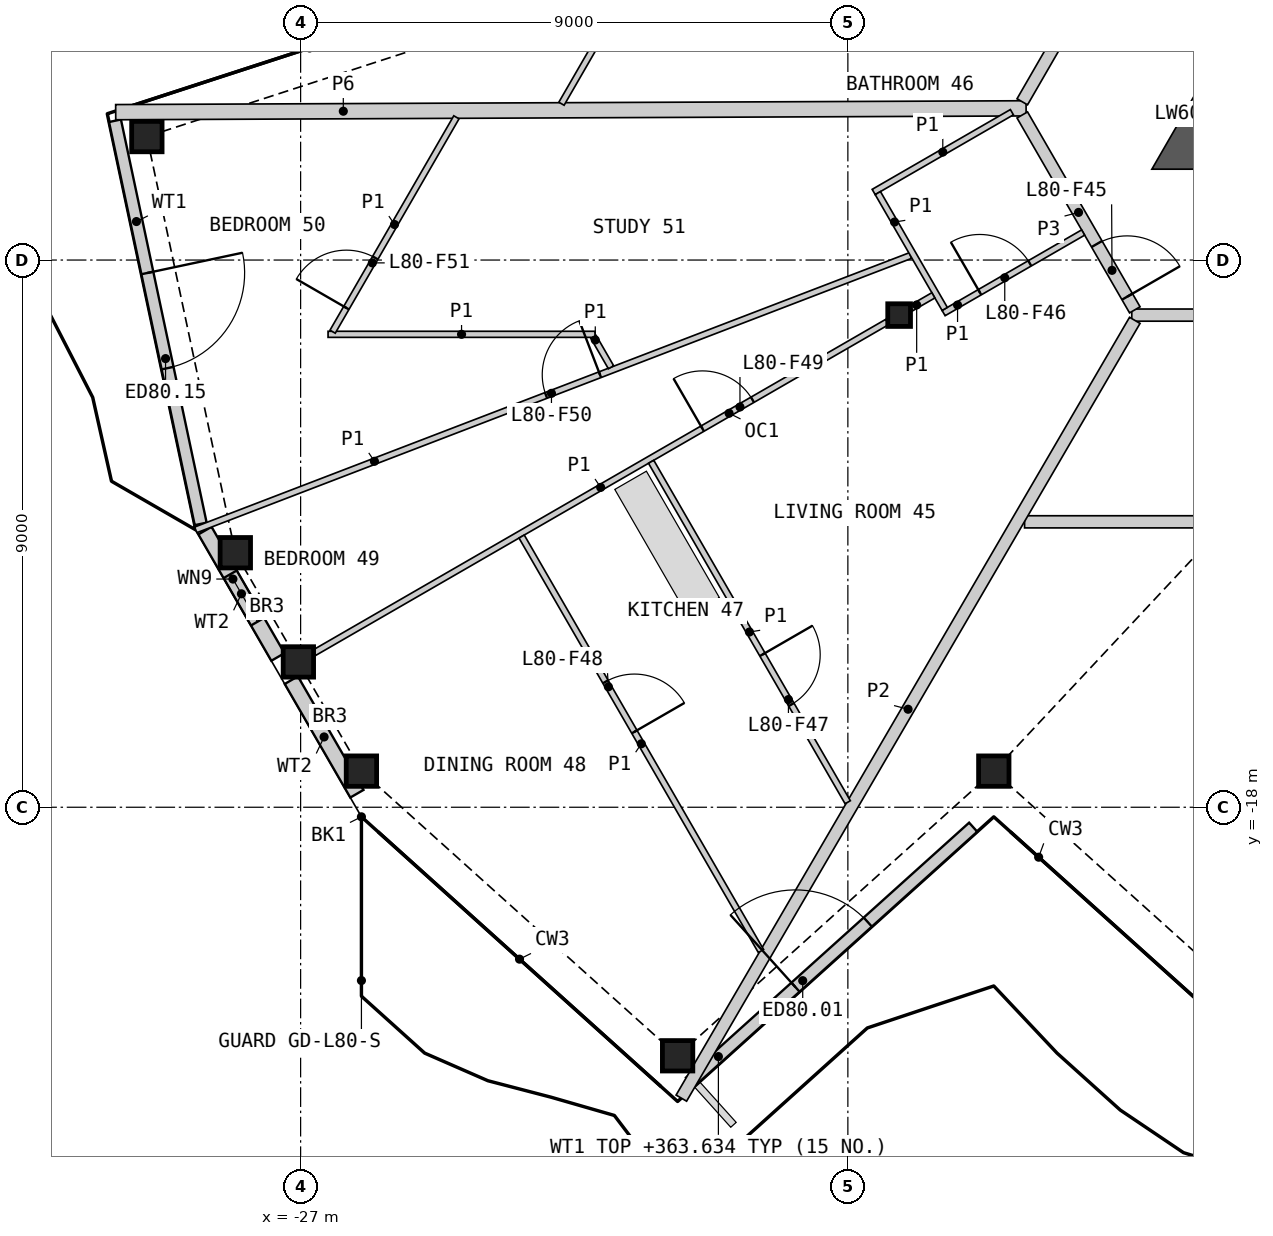
"""IFC4 building model, lengths in metres.
Left out: names, types, materials, properties, quantities, classifications, styles, units other than length and angle.
Written with IfcOpenShell. Run it as: python <this file> out.ifc"""

import sys

from ifc_helpers import new_model, si_unit, direction, frame, frame_2d, origin, origin_2d, place, context, subcontext, project, spatial, polyline, rectangle, hollow_rectangle, i_section, outline, extrude, element, fill, save


model = new_model("IFC4")
c1 = context("Model", 3, precision=1e-05, world=origin(), true_north=direction((0.0, 1.0)))
c2 = subcontext(c1, "Body", "Model", "MODEL_VIEW")
j1 = project(units=[si_unit("LENGTHUNIT", "METRE"), si_unit("PLANEANGLEUNIT", "RADIAN")], contexts=[c1])
p1 = place(None, origin())
s1 = spatial("IfcSite", under=j1, at=p1, CompositionType="ELEMENT")
p2 = place(p1, origin())
s2 = spatial("IfcBuilding", under=s1, at=p2, CompositionType="ELEMENT")
p3 = place(p2, frame((0.0, 0.0, 361.0)))
s3 = spatial("IfcBuildingStorey", under=s2, at=p3, CompositionType="ELEMENT", Elevation=361.0)
for number, where, z_axis, x_axis in (
    (1, (-26.0, -17.406, 0.0), (0.0, 0.0, 1.0), (1.0, 0.0, 0.0)),
    (2, (-20.8, -22.088, 0.0), (0.0, 0.0, 1.0), (1.0, 0.0, 0.0)),
    (3, (-15.6, -17.406, 0.0), (0.0, 0.0, 1.0), (1.0, 0.0, 0.0)),
    (4, (-29.529, -6.969, 0.0), (0.0, 0.0, 1.0), (1.0, 0.0, 0.0)),
    (5, (-28.074, -13.814, 0.0), (0.0, 0.0, 1.0), (1.0, 0.0, 0.0)),
    (6, (-27.037, -15.61, 0.0), (0.0, 0.0, 1.0), (1.0, 0.0, 0.0)),
):
    element("IfcColumn", number, at=place(p3, frame(where, z_axis=z_axis, x_axis=x_axis)), inside=s3, PredefinedType="COLUMN", context=c2, shape_type="SweptSolid", body=[
        extrude(hollow_rectangle(XDim=0.5, YDim=0.5, WallThickness=0.03, at=origin_2d()), origin(), (0.0, 0.0, 1.0), 3.4),
    ])
p4 = place(p3, frame((-17.157, -9.906, 0.0), z_axis=(0.0, 0.0, 1.0), x_axis=(1.0, 0.0, 0.0)))
e7 = element("IfcColumn", 7, at=p4, inside=s3, PredefinedType="COLUMN", context=c2, shape_type="SweptSolid", body=[
    extrude(i_section(OverallWidth=0.374, OverallDepth=0.372, WebThickness=0.016, FlangeThickness=0.026, at=origin_2d()), origin(), (0.0, 0.0, 1.0), 3.4),
])
p5 = place(p3, frame((-20.595, -22.52, 0.0), z_axis=(0.0, 0.0, 1.0), x_axis=(0.743137181878, 0.669139095339, 0.0)))
e8 = element("IfcWall", 8, at=p5, inside=s3, PredefinedType="SOLIDWALL", context=c2, shape_type="SweptSolid", body=[
    extrude(rectangle(XDim=6.265, YDim=0.2, at=frame_2d((3.133, 0.0))), origin(), (0.0, 0.0, 1.0), 2.634),
])
p6 = place(p5, frame((2.333, 0.0, 0.0)))
e9 = element("IfcOpeningElement", 9, at=p6, cuts=e8, PredefinedType="OPENING", context=c2, shape_type="SweptSolid", body=[
    extrude(rectangle(XDim=1.6, YDim=2.25, at=frame_2d((0.8, 1.125))), frame((0.0, 0.11, 0.0), z_axis=(0.0, -1.0, 0.0), x_axis=(1.0, 0.0, 0.0)), (0.0, 0.0, 1.0), 0.22),
])
p7 = place(p3, frame((-30.053, -6.709, 0.0), z_axis=(0.0, 0.0, 1.0), x_axis=(0.207917767315, -0.978146309115, 0.0)))
e10 = element("IfcWall", 10, at=p7, inside=s3, PredefinedType="SOLIDWALL", context=c2, shape_type="SweptSolid", body=[
    extrude(rectangle(XDim=6.779, YDim=0.2, at=frame_2d((3.389, 0.0))), origin(), (0.0, 0.0, 1.0), 2.634),
])
p8 = place(p7, frame((2.559, 0.0, 0.0)))
e11 = element("IfcOpeningElement", 11, at=p8, cuts=e10, PredefinedType="OPENING", context=c2, shape_type="SweptSolid", body=[
    extrude(rectangle(XDim=1.6, YDim=2.25, at=frame_2d((0.8, 1.125))), frame((0.0, 0.11, 0.0), z_axis=(0.0, -1.0, 0.0), x_axis=(1.0, 0.0, 0.0)), (0.0, 0.0, 1.0), 0.22),
])
p9 = place(p3, frame((-28.573, -13.45, 0.0), z_axis=(0.0, 0.0, 1.0), x_axis=(0.499969057507, -0.866043267704, 0.0)))
e12 = element("IfcWall", 12, at=p9, inside=s3, PredefinedType="SOLIDWALL", context=c2, shape_type="SweptSolid", body=[
    extrude(rectangle(XDim=2.4, YDim=0.25, at=frame_2d((1.2, 0.0))), origin(), (0.0, 0.0, 1.0), 2.634),
])
p10 = place(p9, frame((0.83, 0.0, 0.6)))
e13 = element("IfcOpeningElement", 13, at=p10, cuts=e12, PredefinedType="OPENING", context=c2, shape_type="SweptSolid", body=[
    extrude(rectangle(XDim=0.9, YDim=1.8, at=frame_2d((0.45, 0.9))), frame((0.0, 0.135, 0.0), z_axis=(0.0, -1.0, 0.0), x_axis=(1.0, 0.0, 0.0)), (0.0, 0.0, 1.0), 0.27),
])
p11 = place(p3, frame((-27.153, -15.91, 0.0), z_axis=(0.0, 0.0, 1.0), x_axis=(0.50000982419, -0.866019731711, 0.0)))
e14 = element("IfcWall", 14, at=p11, inside=s3, PredefinedType="SOLIDWALL", context=c2, shape_type="SweptSolid", body=[
    extrude(rectangle(XDim=2.157, YDim=0.25, at=frame_2d((1.079, 0.0))), origin(), (0.0, 0.0, 1.0), 2.634),
])
p12 = place(p3, origin())
e15 = element("IfcWall", 15, at=p12, inside=s3, PredefinedType="SHEAR", context=c2, shape_type="SweptSolid", body=[
    extrude(outline(polyline([(-12.48, -6.606), (-11.961, -6.906), (-11.961, -7.506), (-13.0, -7.506), (-12.48, -6.606)])), origin(), (0.0, 0.0, 1.0), 3.1),
])
p13 = place(p3, frame((-10.925, -4.511, 0.0), z_axis=(0.0, 0.0, 1.0), x_axis=(-0.500018667571, -0.866014625789, 0.0)))
e16 = element("IfcWall", 16, at=p13, inside=s3, PredefinedType="SHEAR", context=c2, shape_type="SweptSolid", body=[
    extrude(rectangle(XDim=2.592, YDim=0.6, at=frame_2d((1.296, 0.0))), origin(), (0.0, 0.0, 1.0), 3.1),
])
p14 = place(p13, frame((0.6, 0.0, 0.0)))
e17 = element("IfcOpeningElement", 17, at=p14, cuts=e16, PredefinedType="OPENING", context=c2, shape_type="SweptSolid", body=[
    extrude(rectangle(XDim=1.0, YDim=2.1, at=frame_2d((0.5, 1.05))), frame((0.0, 0.31, 0.0), z_axis=(0.0, -1.0, 0.0), x_axis=(1.0, 0.0, 0.0)), (0.0, 0.0, 1.0), 0.62),
])
p15 = place(p3, frame((-30.041, -6.568, 0.0), z_axis=(0.0, 0.0, 1.0), x_axis=(0.999991150877, 0.004206918925, 0.0)))
e18 = element("IfcWall", 18, at=p15, inside=s3, PredefinedType="PARTITIONING", context=c2, shape_type="SweptSolid", body=[
    extrude(rectangle(XDim=14.973, YDim=0.25, at=frame_2d((7.486, 0.0))), origin(), (0.0, 0.0, 1.0), 2.33),
])
p16 = place(p3, frame((-13.331, -9.906, 0.0), z_axis=(0.0, 0.0, 1.0), x_axis=(1.0, 0.0, 0.0)))
e19 = element("IfcWall", 19, at=p16, inside=s3, PredefinedType="PARTITIONING", context=c2, shape_type="SweptSolid", body=[
    extrude(rectangle(XDim=4.555, YDim=0.2, at=frame_2d((2.278, 0.0))), origin(), (0.0, 0.0, 1.0), 3.1),
])
p17 = place(p3, frame((-15.131, -6.397, 0.0), z_axis=(0.0, 0.0, 1.0), x_axis=(0.499986217557, 0.866033360935, 0.0)))
e20 = element("IfcWall", 20, at=p17, inside=s3, PredefinedType="PARTITIONING", context=c2, shape_type="SweptSolid", body=[
    extrude(rectangle(XDim=4.3, YDim=0.2, at=frame_2d((2.15, 0.0))), origin(), (0.0, 0.0, 1.0), 3.1),
])
p18 = place(p3, frame((-15.131, -6.614, 0.0), z_axis=(0.0, 0.0, 1.0), x_axis=(0.499948957823, -0.866054870994, 0.0)))
e21 = element("IfcWall", 21, at=p18, inside=s3, PredefinedType="PARTITIONING", context=c2, shape_type="SweptSolid", body=[
    extrude(rectangle(XDim=3.701, YDim=0.2, at=frame_2d((1.851, 0.0))), origin(), (0.0, 0.0, 1.0), 3.1),
])
p19 = place(p18, frame((2.451, 0.0, 0.0)))
e22 = element("IfcOpeningElement", 22, at=p19, cuts=e21, PredefinedType="OPENING", context=c2, shape_type="SweptSolid", body=[
    extrude(rectangle(XDim=1.0, YDim=2.1, at=frame_2d((0.5, 1.05))), frame((0.0, 0.11, 0.0), z_axis=(0.0, -1.0, 0.0), x_axis=(1.0, 0.0, 0.0)), (0.0, 0.0, 1.0), 0.22),
])
p20 = place(p3, frame((-15.094, -13.306, 0.0), z_axis=(0.0, 0.0, 1.0), x_axis=(1.0, 0.0, 0.0)))
e23 = element("IfcWall", 23, at=p20, inside=s3, PredefinedType="PARTITIONING", context=c2, shape_type="SweptSolid", body=[
    extrude(rectangle(XDim=14.994, YDim=0.2, at=frame_2d((7.497, 0.0))), origin(), (0.0, 0.0, 1.0), 2.33),
])
p21 = place(p20, frame((6.27, 0.0, 0.0)))
e24 = element("IfcOpeningElement", 24, at=p21, cuts=e23, PredefinedType="OPENING", context=c2, shape_type="SweptSolid", body=[
    extrude(rectangle(XDim=0.95, YDim=2.1, at=frame_2d((0.475, 1.05))), frame((0.0, 0.11, 0.0), z_axis=(0.0, -1.0, 0.0), x_axis=(1.0, 0.0, 0.0)), (0.0, 0.0, 1.0), 0.22),
])
p22 = place(p3, frame((-20.739, -22.784, 0.0), z_axis=(0.0, 0.0, 1.0), x_axis=(0.50362599185, 0.863921790635, 0.0)))
e25 = element("IfcWall", 25, at=p22, inside=s3, PredefinedType="PARTITIONING", context=c2, shape_type="SweptSolid", body=[
    extrude(rectangle(XDim=14.807, YDim=0.2, at=frame_2d((7.404, 0.0))), origin(), (0.0, 0.0, 1.0), 2.33),
])
p23 = place(p3, frame((-28.725, -13.438, 0.0), z_axis=(0.0, 0.0, 1.0), x_axis=(0.933580312145, 0.358368247444, 0.0)))
e26 = element("IfcWall", 26, at=p23, inside=s3, PredefinedType="PARTITIONING", context=c2, shape_type="SweptSolid", body=[
    extrude(rectangle(XDim=12.59, YDim=0.1, at=frame_2d((6.295, 0.0))), origin(), (0.0, 0.0, 1.0), 2.33),
])
p24 = place(p23, frame((6.171, 0.0, 0.0)))
e27 = element("IfcOpeningElement", 27, at=p24, cuts=e26, PredefinedType="OPENING", context=c2, shape_type="SweptSolid", body=[
    extrude(rectangle(XDim=0.95, YDim=2.1, at=frame_2d((0.475, 1.05))), frame((0.0, 0.06, 0.0), z_axis=(0.0, -1.0, 0.0), x_axis=(1.0, 0.0, 0.0)), (0.0, 0.0, 1.0), 0.12),
])
p25 = place(p3, frame((-26.777, -15.46, 0.0), z_axis=(0.0, 0.0, 1.0), x_axis=(0.866019680922, 0.500009912158, 0.0)))
e28 = element("IfcWall", 28, at=p25, inside=s3, PredefinedType="PARTITIONING", context=c2, shape_type="SweptSolid", body=[
    extrude(rectangle(XDim=10.881, YDim=0.1, at=frame_2d((5.44, 0.0))), origin(), (0.0, 0.0, 1.0), 2.33),
])
p26 = place(p25, frame((7.373, 0.0, 0.0)))
e29 = element("IfcOpeningElement", 29, at=p26, cuts=e28, PredefinedType="OPENING", context=c2, shape_type="SweptSolid", body=[
    extrude(rectangle(XDim=0.95, YDim=2.1, at=frame_2d((0.475, 1.05))), frame((0.0, 0.06, 0.0), z_axis=(0.0, -1.0, 0.0), x_axis=(1.0, 0.0, 0.0)), (0.0, 0.0, 1.0), 0.12),
])
p27 = place(p3, frame((-23.365, -13.548, 0.0), z_axis=(0.0, 0.0, 1.0), x_axis=(0.500011483804, -0.866018773506, 0.0)))
e30 = element("IfcWall", 30, at=p27, inside=s3, PredefinedType="PARTITIONING", context=c2, shape_type="SweptSolid", body=[
    extrude(rectangle(XDim=7.872, YDim=0.1, at=frame_2d((3.936, 0.0))), origin(), (0.0, 0.0, 1.0), 2.33),
])
p28 = place(p27, frame((2.759, 0.0, 0.0)))
e31 = element("IfcOpeningElement", 31, at=p28, cuts=e30, PredefinedType="OPENING", context=c2, shape_type="SweptSolid", body=[
    extrude(rectangle(XDim=0.95, YDim=2.1, at=frame_2d((0.475, 1.05))), frame((0.0, 0.06, 0.0), z_axis=(0.0, -1.0, 0.0), x_axis=(1.0, 0.0, 0.0)), (0.0, 0.0, 1.0), 0.12),
])
p29 = place(p3, frame((-22.71, -6.429, 0.0), z_axis=(0.0, 0.0, 1.0), x_axis=(0.499984737558, 0.86603421538, 0.0)))
e32 = element("IfcWall", 32, at=p29, inside=s3, PredefinedType="PARTITIONING", context=c2, shape_type="SweptSolid", body=[
    extrude(rectangle(XDim=6.473, YDim=0.1, at=frame_2d((3.236, 0.0))), origin(), (0.0, 0.0, 1.0), 2.33),
])
p30 = place(p29, frame((3.063, 0.0, 0.0)))
e33 = element("IfcOpeningElement", 33, at=p30, cuts=e32, PredefinedType="OPENING", context=c2, shape_type="SweptSolid", body=[
    extrude(rectangle(XDim=0.95, YDim=2.1, at=frame_2d((0.475, 1.05))), frame((0.0, 0.06, 0.0), z_axis=(0.0, -1.0, 0.0), x_axis=(1.0, 0.0, 0.0)), (0.0, 0.0, 1.0), 0.12),
])
p31 = place(p3, frame((-21.235, -12.318, 0.0), z_axis=(0.0, 0.0, 1.0), x_axis=(0.500008973052, -0.866020223129, 0.0)))
e34 = element("IfcWall", 34, at=p31, inside=s3, PredefinedType="PARTITIONING", context=c2, shape_type="SweptSolid", body=[
    extrude(rectangle(XDim=6.466, YDim=0.1, at=frame_2d((3.233, 0.0))), origin(), (0.0, 0.0, 1.0), 2.33),
])
p32 = place(p31, frame((3.661, 0.0, 0.0)))
e35 = element("IfcOpeningElement", 35, at=p32, cuts=e34, PredefinedType="OPENING", context=c2, shape_type="SweptSolid", body=[
    extrude(rectangle(XDim=0.95, YDim=2.1, at=frame_2d((0.475, 1.05))), frame((0.0, 0.06, 0.0), z_axis=(0.0, -1.0, 0.0), x_axis=(1.0, 0.0, 0.0)), (0.0, 0.0, 1.0), 0.12),
])
p33 = place(p3, frame((-26.549, -10.222, 0.0), z_axis=(0.0, 0.0, 1.0), x_axis=(1.0, 0.0, 0.0)))
e36 = element("IfcWall", 36, at=p33, inside=s3, PredefinedType="PARTITIONING", context=c2, shape_type="SweptSolid", body=[
    extrude(rectangle(XDim=4.391, YDim=0.1, at=frame_2d((2.195, 0.0))), origin(), (0.0, 0.0, 1.0), 2.33),
])
p34 = place(p3, frame((-26.474, -10.178, 0.0), z_axis=(0.0, 0.0, 1.0), x_axis=(0.499995835917, 0.866027807905, 0.0)))
e37 = element("IfcWall", 37, at=p34, inside=s3, PredefinedType="PARTITIONING", context=c2, shape_type="SweptSolid", body=[
    extrude(rectangle(XDim=4.071, YDim=0.1, at=frame_2d((2.036, 0.0))), origin(), (0.0, 0.0, 1.0), 2.33),
])
p35 = place(p34, frame((0.452, 0.0, 0.0)))
e38 = element("IfcOpeningElement", 38, at=p35, cuts=e37, PredefinedType="OPENING", context=c2, shape_type="SweptSolid", body=[
    extrude(rectangle(XDim=0.95, YDim=2.1, at=frame_2d((0.475, 1.05))), frame((0.0, 0.06, 0.0), z_axis=(0.0, -1.0, 0.0), x_axis=(1.0, 0.0, 0.0)), (0.0, 0.0, 1.0), 0.12),
])
p36 = place(p3, frame((-17.575, -7.881, 0.0), z_axis=(0.0, 0.0, 1.0), x_axis=(0.866013657776, 0.500020344131, 0.0)))
e39 = element("IfcWall", 39, at=p36, inside=s3, PredefinedType="PARTITIONING", context=c2, shape_type="SweptSolid", body=[
    extrude(rectangle(XDim=2.625, YDim=0.1, at=frame_2d((1.312, 0.0))), origin(), (0.0, 0.0, 1.0), 2.33),
])
p37 = place(p3, frame((-16.426, -9.872, 0.0), z_axis=(0.0, 0.0, 1.0), x_axis=(0.866029095148, 0.499993606316, 0.0)))
e40 = element("IfcWall", 40, at=p37, inside=s3, PredefinedType="PARTITIONING", context=c2, shape_type="SweptSolid", body=[
    extrude(rectangle(XDim=2.65, YDim=0.1, at=frame_2d((1.325, 0.0))), origin(), (0.0, 0.0, 1.0), 2.33),
])
p38 = place(p37, frame((0.686, 0.0, 0.0)))
e41 = element("IfcOpeningElement", 41, at=p38, cuts=e40, PredefinedType="OPENING", context=c2, shape_type="SweptSolid", body=[
    extrude(rectangle(XDim=0.95, YDim=2.1, at=frame_2d((0.475, 1.05))), frame((0.0, 0.06, 0.0), z_axis=(0.0, -1.0, 0.0), x_axis=(1.0, 0.0, 0.0)), (0.0, 0.0, 1.0), 0.12),
])
p39 = place(p3, frame((-17.507, -7.899, 0.0), z_axis=(0.0, 0.0, 1.0), x_axis=(0.499946605688, -0.86605622881, 0.0)))
e42 = element("IfcWall", 42, at=p39, inside=s3, PredefinedType="PARTITIONING", context=c2, shape_type="SweptSolid", body=[
    extrude(rectangle(XDim=2.2, YDim=0.1, at=frame_2d((1.1, 0.0))), origin(), (0.0, 0.0, 1.0), 2.33),
])
p40 = place(p3, frame((-22.183, -10.265, 0.0), z_axis=(0.0, 0.0, 1.0), x_axis=(0.500016142392, -0.86601608377, 0.0)))
e43 = element("IfcWall", 43, at=p40, inside=s3, PredefinedType="PARTITIONING", context=c2, shape_type="SweptSolid", body=[
    extrude(rectangle(XDim=0.576, YDim=0.1, at=frame_2d((0.288, 0.0))), origin(), (0.0, 0.0, 1.0), 2.33),
])
p41 = place(p3, frame((-16.96, -9.792, 0.0), z_axis=(0.0, 0.0, 1.0), x_axis=(0.866137484628, 0.499805820016, 0.0)))
e44 = element("IfcWall", 44, at=p41, inside=s3, PredefinedType="PARTITIONING", context=c2, shape_type="SweptSolid", body=[
    extrude(rectangle(XDim=0.423, YDim=0.1, at=frame_2d((0.211, 0.0))), origin(), (0.0, 0.0, 1.0), 2.33),
])
p42 = place(p6, origin())
e45 = element("IfcDoor", 45, at=p42, inside=s3, OperationType="DOUBLE_DOOR_SINGLE_SWING", PredefinedType="DOOR", context=c2, shape_type="SweptSolid", body=[
    extrude(rectangle(XDim=1.6, YDim=2.25, at=frame_2d((0.8, 1.125))), frame((0.0, 0.025, 0.0), z_axis=(0.0, -1.0, 0.0), x_axis=(1.0, 0.0, 0.0)), (0.0, 0.0, 1.0), 0.05),
])
fill(e9, e45)
p43 = place(p8, origin())
e46 = element("IfcDoor", 46, at=p43, inside=s3, OperationType="DOUBLE_DOOR_SINGLE_SWING", PredefinedType="DOOR", context=c2, shape_type="SweptSolid", body=[
    extrude(rectangle(XDim=1.6, YDim=2.25, at=frame_2d((0.8, 1.125))), frame((0.0, 0.025, 0.0), z_axis=(0.0, -1.0, 0.0), x_axis=(1.0, 0.0, 0.0)), (0.0, 0.0, 1.0), 0.05),
])
fill(e11, e46)
p44 = place(p10, origin())
e47 = element("IfcWindow", 47, at=p44, inside=s3, PartitioningType="SINGLE_PANEL", PredefinedType="WINDOW", context=c2, shape_type="SweptSolid", body=[
    extrude(rectangle(XDim=0.9, YDim=1.8, at=frame_2d((0.45, 0.9))), frame((0.0, 0.03, 0.0), z_axis=(0.0, -1.0, 0.0), x_axis=(1.0, 0.0, 0.0)), (0.0, 0.0, 1.0), 0.06),
])
fill(e13, e47)
p45 = place(p19, origin())
e48 = element("IfcDoor", 48, at=p45, inside=s3, OperationType="SINGLE_SWING_RIGHT", PredefinedType="DOOR", context=c2, shape_type="SweptSolid", body=[
    extrude(rectangle(XDim=1.0, YDim=2.1, at=frame_2d((0.5, 1.05))), frame((0.0, 0.025, 0.0), z_axis=(0.0, -1.0, 0.0), x_axis=(1.0, 0.0, 0.0)), (0.0, 0.0, 1.0), 0.05),
])
fill(e22, e48)
p46 = place(p38, origin())
e49 = element("IfcDoor", 49, at=p46, inside=s3, OperationType="SINGLE_SWING_LEFT", PredefinedType="DOOR", context=c2, shape_type="SweptSolid", body=[
    extrude(rectangle(XDim=0.95, YDim=2.1, at=frame_2d((0.475, 1.05))), frame((0.0, 0.025, 0.0), z_axis=(0.0, -1.0, 0.0), x_axis=(1.0, 0.0, 0.0)), (0.0, 0.0, 1.0), 0.05),
])
fill(e41, e49)
p47 = place(p32, origin())
e50 = element("IfcDoor", 50, at=p47, inside=s3, OperationType="SINGLE_SWING_LEFT", PredefinedType="DOOR", context=c2, shape_type="SweptSolid", body=[
    extrude(rectangle(XDim=0.95, YDim=2.1, at=frame_2d((0.475, 1.05))), frame((0.0, 0.025, 0.0), z_axis=(0.0, -1.0, 0.0), x_axis=(1.0, 0.0, 0.0)), (0.0, 0.0, 1.0), 0.05),
])
fill(e35, e50)
p48 = place(p28, origin())
e51 = element("IfcDoor", 51, at=p48, inside=s3, OperationType="SINGLE_SWING_RIGHT", PredefinedType="DOOR", context=c2, shape_type="SweptSolid", body=[
    extrude(rectangle(XDim=0.95, YDim=2.1, at=frame_2d((0.475, 1.05))), frame((0.0, 0.025, 0.0), z_axis=(0.0, -1.0, 0.0), x_axis=(1.0, 0.0, 0.0)), (0.0, 0.0, 1.0), 0.05),
])
fill(e31, e51)
p49 = place(p26, origin())
e52 = element("IfcDoor", 52, at=p49, inside=s3, OperationType="SINGLE_SWING_LEFT", PredefinedType="DOOR", context=c2, shape_type="SweptSolid", body=[
    extrude(rectangle(XDim=0.95, YDim=2.1, at=frame_2d((0.475, 1.05))), frame((0.0, 0.025, 0.0), z_axis=(0.0, -1.0, 0.0), x_axis=(1.0, 0.0, 0.0)), (0.0, 0.0, 1.0), 0.05),
])
fill(e29, e52)
p50 = place(p24, origin())
e53 = element("IfcDoor", 53, at=p50, inside=s3, OperationType="SINGLE_SWING_RIGHT", PredefinedType="DOOR", context=c2, shape_type="SweptSolid", body=[
    extrude(rectangle(XDim=0.95, YDim=2.1, at=frame_2d((0.475, 1.05))), frame((0.0, 0.025, 0.0), z_axis=(0.0, -1.0, 0.0), x_axis=(1.0, 0.0, 0.0)), (0.0, 0.0, 1.0), 0.05),
])
fill(e27, e53)
p51 = place(p35, origin())
e54 = element("IfcDoor", 54, at=p51, inside=s3, OperationType="SINGLE_SWING_LEFT", PredefinedType="DOOR", context=c2, shape_type="SweptSolid", body=[
    extrude(rectangle(XDim=0.95, YDim=2.1, at=frame_2d((0.475, 1.05))), frame((0.0, 0.025, 0.0), z_axis=(0.0, -1.0, 0.0), x_axis=(1.0, 0.0, 0.0)), (0.0, 0.0, 1.0), 0.05),
])
fill(e38, e54)
save(model, sys.argv[1])
